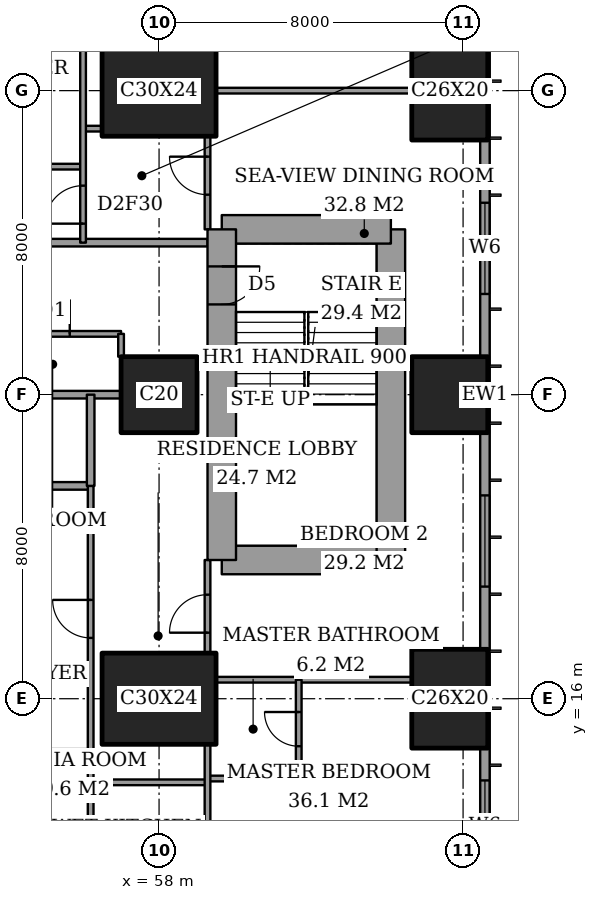
"""IFC4 building model, lengths in metres.
Left out: names, types, materials, properties, quantities, classifications, styles, units other than length and angle.
Written with IfcOpenShell. Run it as: python <this file> out.ifc"""

import sys

from ifc_helpers import new_model, si_unit, direction, frame, frame_2d, origin, origin_2d, place, context, subcontext, project, spatial, rectangle, extrude, element, fill, save


model = new_model("IFC4")
c1 = context("Model", 3, precision=1e-05, world=origin(), true_north=direction((0.0, 1.0)))
c2 = subcontext(c1, "Body", "Model", "MODEL_VIEW")
j1 = project(units=[si_unit("LENGTHUNIT", "METRE"), si_unit("PLANEANGLEUNIT", "RADIAN")], contexts=[c1])
p1 = place(None, origin())
s1 = spatial("IfcSite", under=j1, at=p1, CompositionType="ELEMENT")
p2 = place(p1, origin())
s2 = spatial("IfcBuilding", under=s1, at=p2, CompositionType="ELEMENT")
p3 = place(p2, frame((0.0, 0.0, 44.0)))
s3 = spatial("IfcBuildingStorey", under=s2, at=p3, CompositionType="ELEMENT", Elevation=44.0)
p4 = place(p3, frame((58.0, 16.0, 0.0), z_axis=(0.0, 0.0, 1.0), x_axis=(1.0, 0.0, 0.0)))
e1 = element("IfcColumn", 1, at=p4, inside=s3, PredefinedType="COLUMN", context=c2, shape_type="SweptSolid", body=[
    extrude(rectangle(XDim=3.0, YDim=2.4, at=origin_2d()), origin(), (0.0, 0.0, 1.0), 3.6),
])
p5 = place(p3, frame((58.0, 24.0, 0.0), z_axis=(0.0, 0.0, 1.0), x_axis=(1.0, 0.0, 0.0)))
e2 = element("IfcColumn", 2, at=p5, inside=s3, PredefinedType="COLUMN", context=c2, shape_type="SweptSolid", body=[
    extrude(rectangle(XDim=2.0, YDim=2.0, at=origin_2d()), origin(), (0.0, 0.0, 1.0), 3.6),
])
p6 = place(p3, frame((58.0, 32.0, 0.0), z_axis=(0.0, 0.0, 1.0), x_axis=(1.0, 0.0, 0.0)))
e3 = element("IfcColumn", 3, at=p6, inside=s3, PredefinedType="COLUMN", context=c2, shape_type="SweptSolid", body=[
    extrude(rectangle(XDim=3.0, YDim=2.4, at=origin_2d()), origin(), (0.0, 0.0, 1.0), 3.6),
])
p7 = place(p3, frame((65.65, 16.0, 0.0), z_axis=(0.0, 0.0, 1.0), x_axis=(0.0, 1.0, 0.0)))
e4 = element("IfcColumn", 4, at=p7, inside=s3, PredefinedType="COLUMN", context=c2, shape_type="SweptSolid", body=[
    extrude(rectangle(XDim=2.6, YDim=2.0, at=origin_2d()), origin(), (0.0, 0.0, 1.0), 3.6),
])
p8 = place(p3, frame((65.65, 24.0, 0.0), z_axis=(0.0, 0.0, 1.0), x_axis=(1.0, 0.0, 0.0)))
e5 = element("IfcColumn", 5, at=p8, inside=s3, PredefinedType="COLUMN", context=c2, shape_type="SweptSolid", body=[
    extrude(rectangle(XDim=2.0, YDim=2.0, at=origin_2d()), origin(), (0.0, 0.0, 1.0), 3.6),
])
p9 = place(p3, frame((65.65, 32.0, 0.0), z_axis=(0.0, 0.0, 1.0), x_axis=(0.0, 1.0, 0.0)))
e6 = element("IfcColumn", 6, at=p9, inside=s3, PredefinedType="COLUMN", context=c2, shape_type="SweptSolid", body=[
    extrude(rectangle(XDim=2.6, YDim=2.0, at=origin_2d()), origin(), (0.0, 0.0, 1.0), 3.6),
])
p10 = place(p3, frame((59.65, 19.65, 0.0), z_axis=(0.0, 0.0, 1.0), x_axis=(1.0, 0.0, 0.0)))
e7 = element("IfcWall", 7, at=p10, inside=s3, PredefinedType="SHEAR", context=c2, shape_type="SweptSolid", body=[
    extrude(rectangle(XDim=4.45, YDim=0.75, at=frame_2d((2.225, 0.0))), origin(), (0.0, 0.0, 1.0), 3.6),
])
p11 = place(p3, frame((64.1, 19.65, 0.0), z_axis=(0.0, 0.0, 1.0), x_axis=(0.0, 1.0, 0.0)))
e8 = element("IfcWall", 8, at=p11, inside=s3, PredefinedType="SHEAR", context=c2, shape_type="SweptSolid", body=[
    extrude(rectangle(XDim=8.7, YDim=0.75, at=frame_2d((4.35, 0.0))), origin(), (0.0, 0.0, 1.0), 3.6),
])
p12 = place(p3, frame((64.1, 28.35, 0.0), z_axis=(0.0, 0.0, 1.0), x_axis=(-1.0, 0.0, 0.0)))
e9 = element("IfcWall", 9, at=p12, inside=s3, PredefinedType="SHEAR", context=c2, shape_type="SweptSolid", body=[
    extrude(rectangle(XDim=4.45, YDim=0.75, at=frame_2d((2.225, 0.0))), origin(), (0.0, 0.0, 1.0), 3.6),
])
p13 = place(p3, frame((59.65, 28.35, 0.0), z_axis=(0.0, 0.0, 1.0), x_axis=(0.0, -1.0, 0.0)))
e10 = element("IfcWall", 10, at=p13, inside=s3, PredefinedType="SHEAR", context=c2, shape_type="SweptSolid", body=[
    extrude(rectangle(XDim=8.7, YDim=0.75, at=frame_2d((4.35, 0.0))), origin(), (0.0, 0.0, 1.0), 3.6),
])
p14 = place(p13, frame((0.975, 0.0, 0.0)))
e11 = element("IfcOpeningElement", 11, at=p14, cuts=e10, PredefinedType="OPENING", context=c2, shape_type="SweptSolid", body=[
    extrude(rectangle(XDim=1.0, YDim=2.1, at=frame_2d((0.5, 1.05))), frame((0.0, 0.385, 0.0), z_axis=(0.0, -1.0, 0.0), x_axis=(1.0, 0.0, 0.0)), (0.0, 0.0, 1.0), 0.77),
])
p15 = place(p3, frame((66.575, 3.175, 0.0), z_axis=(0.0, 0.0, 1.0), x_axis=(0.0, 1.0, 0.0)))
e12 = element("IfcWall", 12, at=p15, inside=s3, PredefinedType="SOLIDWALL", context=c2, shape_type="SweptSolid", body=[
    extrude(rectangle(XDim=41.65, YDim=0.25, at=frame_2d((20.825, 0.0))), origin(), (0.0, 0.0, 1.0), 3.6),
])
p16 = place(p15, frame((0.775, 0.0, 0.6)))
e13 = element("IfcOpeningElement", 13, at=p16, cuts=e12, PredefinedType="OPENING", context=c2, shape_type="SweptSolid", body=[
    extrude(rectangle(XDim=2.4, YDim=2.0, at=frame_2d((1.2, 1.0))), frame((0.0, 0.135, 0.0), z_axis=(0.0, -1.0, 0.0), x_axis=(1.0, 0.0, 0.0)), (0.0, 0.0, 1.0), 0.27),
])
p17 = place(p15, frame((6.1, 0.0, 0.6)))
e14 = element("IfcOpeningElement", 14, at=p17, cuts=e12, PredefinedType="OPENING", context=c2, shape_type="SweptSolid", body=[
    extrude(rectangle(XDim=1.2, YDim=2.0, at=frame_2d((0.6, 1.0))), frame((0.0, 0.135, 0.0), z_axis=(0.0, -1.0, 0.0), x_axis=(1.0, 0.0, 0.0)), (0.0, 0.0, 1.0), 0.27),
])
p18 = place(p15, frame((8.275, 0.0, 0.6)))
e15 = element("IfcOpeningElement", 15, at=p18, cuts=e12, PredefinedType="OPENING", context=c2, shape_type="SweptSolid", body=[
    extrude(rectangle(XDim=2.4, YDim=2.0, at=frame_2d((1.2, 1.0))), frame((0.0, 0.135, 0.0), z_axis=(0.0, -1.0, 0.0), x_axis=(1.0, 0.0, 0.0)), (0.0, 0.0, 1.0), 0.27),
])
p19 = place(p15, frame((15.775, 0.0, 0.6)))
e16 = element("IfcOpeningElement", 16, at=p19, cuts=e12, PredefinedType="OPENING", context=c2, shape_type="SweptSolid", body=[
    extrude(rectangle(XDim=2.4, YDim=2.0, at=frame_2d((1.2, 1.0))), frame((0.0, 0.135, 0.0), z_axis=(0.0, -1.0, 0.0), x_axis=(1.0, 0.0, 0.0)), (0.0, 0.0, 1.0), 0.27),
])
p20 = place(p15, frame((23.475, 0.0, 0.6)))
e17 = element("IfcOpeningElement", 17, at=p20, cuts=e12, PredefinedType="OPENING", context=c2, shape_type="SweptSolid", body=[
    extrude(rectangle(XDim=2.4, YDim=2.0, at=frame_2d((1.2, 1.0))), frame((0.0, 0.135, 0.0), z_axis=(0.0, -1.0, 0.0), x_axis=(1.0, 0.0, 0.0)), (0.0, 0.0, 1.0), 0.27),
])
p21 = place(p15, frame((30.975, 0.0, 0.6)))
e18 = element("IfcOpeningElement", 18, at=p21, cuts=e12, PredefinedType="OPENING", context=c2, shape_type="SweptSolid", body=[
    extrude(rectangle(XDim=2.4, YDim=2.0, at=frame_2d((1.2, 1.0))), frame((0.0, 0.135, 0.0), z_axis=(0.0, -1.0, 0.0), x_axis=(1.0, 0.0, 0.0)), (0.0, 0.0, 1.0), 0.27),
])
p22 = place(p15, frame((34.5, 0.0, 0.6)))
e19 = element("IfcOpeningElement", 19, at=p22, cuts=e12, PredefinedType="OPENING", context=c2, shape_type="SweptSolid", body=[
    extrude(rectangle(XDim=1.2, YDim=2.0, at=frame_2d((0.6, 1.0))), frame((0.0, 0.135, 0.0), z_axis=(0.0, -1.0, 0.0), x_axis=(1.0, 0.0, 0.0)), (0.0, 0.0, 1.0), 0.27),
])
p23 = place(p15, frame((38.475, 0.0, 0.6)))
e20 = element("IfcOpeningElement", 20, at=p23, cuts=e12, PredefinedType="OPENING", context=c2, shape_type="SweptSolid", body=[
    extrude(rectangle(XDim=2.4, YDim=2.0, at=frame_2d((1.2, 1.0))), frame((0.0, 0.135, 0.0), z_axis=(0.0, -1.0, 0.0), x_axis=(1.0, 0.0, 0.0)), (0.0, 0.0, 1.0), 0.27),
])
p24 = place(p3, frame((56.2, 13.8, 0.0), z_axis=(0.0, 0.0, 1.0), x_axis=(1.0, 0.0, 0.0)))
e21 = element("IfcWall", 21, at=p24, inside=s3, PredefinedType="PARTITIONING", context=c2, shape_type="SweptSolid", body=[
    extrude(rectangle(XDim=3.075, YDim=0.15, at=frame_2d((1.538, 0.0))), origin(), (0.0, 0.0, 1.0), 3.35),
])
p25 = place(p3, frame((59.275, 13.9, 0.0), z_axis=(0.0, 0.0, 1.0), x_axis=(1.0, 0.0, 0.0)))
e22 = element("IfcWall", 22, at=p25, inside=s3, PredefinedType="PARTITIONING", context=c2, shape_type="SweptSolid", body=[
    extrude(rectangle(XDim=2.4, YDim=0.15, at=frame_2d((1.2, 0.0))), origin(), (0.0, 0.0, 1.0), 3.35),
])
p26 = place(p3, frame((48.0, 14.6, 0.0), z_axis=(0.0, 0.0, 1.0), x_axis=(1.0, 0.0, 0.0)))
e23 = element("IfcWall", 23, at=p26, inside=s3, PredefinedType="PARTITIONING", context=c2, shape_type="SweptSolid", body=[
    extrude(rectangle(XDim=8.2, YDim=0.15, at=frame_2d((4.1, 0.0))), origin(), (0.0, 0.0, 1.0), 3.35),
])
p27 = place(p26, frame((4.2, 0.0, 0.0)))
e24 = element("IfcOpeningElement", 24, at=p27, cuts=e23, PredefinedType="OPENING", context=c2, shape_type="SweptSolid", body=[
    extrude(rectangle(XDim=1.0, YDim=2.1, at=frame_2d((0.5, 1.05))), frame((0.0, 0.085, 0.0), z_axis=(0.0, -1.0, 0.0), x_axis=(1.0, 0.0, 0.0)), (0.0, 0.0, 1.0), 0.17),
])
p28 = place(p3, frame((59.5, 16.5, 0.0), z_axis=(0.0, 0.0, 1.0), x_axis=(1.0, 0.0, 0.0)))
e25 = element("IfcWall", 25, at=p28, inside=s3, PredefinedType="PARTITIONING", context=c2, shape_type="SweptSolid", body=[
    extrude(rectangle(XDim=5.15, YDim=0.15, at=frame_2d((2.575, 0.0))), origin(), (0.0, 0.0, 1.0), 3.35),
])
p29 = place(p3, frame((51.2, 21.6, 0.0), z_axis=(0.0, 0.0, 1.0), x_axis=(1.0, 0.0, 0.0)))
e26 = element("IfcWall", 26, at=p29, inside=s3, PredefinedType="PARTITIONING", context=c2, shape_type="SweptSolid", body=[
    extrude(rectangle(XDim=5.0, YDim=0.2, at=frame_2d((2.5, 0.0))), origin(), (0.0, 0.0, 1.0), 3.35),
])
p30 = place(p29, frame((2.05, 0.0, 0.0)))
e27 = element("IfcOpeningElement", 27, at=p30, cuts=e26, PredefinedType="OPENING", context=c2, shape_type="SweptSolid", body=[
    extrude(rectangle(XDim=0.9, YDim=2.1, at=frame_2d((0.45, 1.05))), frame((0.0, 0.11, 0.0), z_axis=(0.0, -1.0, 0.0), x_axis=(1.0, 0.0, 0.0)), (0.0, 0.0, 1.0), 0.22),
])
p31 = place(p3, frame((51.0, 24.0, 0.0), z_axis=(0.0, 0.0, 1.0), x_axis=(1.0, 0.0, 0.0)))
e28 = element("IfcWall", 28, at=p31, inside=s3, PredefinedType="PARTITIONING", context=c2, shape_type="SweptSolid", body=[
    extrude(rectangle(XDim=6.0, YDim=0.2, at=frame_2d((3.0, 0.0))), origin(), (0.0, 0.0, 1.0), 3.35),
])
p32 = place(p3, frame((53.4, 25.6, 0.0), z_axis=(0.0, 0.0, 1.0), x_axis=(1.0, 0.0, 0.0)))
e29 = element("IfcWall", 29, at=p32, inside=s3, PredefinedType="PARTITIONING", context=c2, shape_type="SweptSolid", body=[
    extrude(rectangle(XDim=3.6, YDim=0.15, at=frame_2d((1.8, 0.0))), origin(), (0.0, 0.0, 1.0), 3.35),
])
p33 = place(p32, frame((1.35, 0.0, 0.0)))
e30 = element("IfcOpeningElement", 30, at=p33, cuts=e29, PredefinedType="OPENING", context=c2, shape_type="SweptSolid", body=[
    extrude(rectangle(XDim=0.9, YDim=2.1, at=frame_2d((0.45, 1.05))), frame((0.0, 0.085, 0.0), z_axis=(0.0, -1.0, 0.0), x_axis=(1.0, 0.0, 0.0)), (0.0, 0.0, 1.0), 0.17),
])
p34 = place(p3, frame((42.0, 28.0, 0.0), z_axis=(0.0, 0.0, 1.0), x_axis=(1.0, 0.0, 0.0)))
e31 = element("IfcWall", 31, at=p34, inside=s3, PredefinedType="PARTITIONING", context=c2, shape_type="SweptSolid", body=[
    extrude(rectangle(XDim=17.275, YDim=0.2, at=frame_2d((8.637, 0.0))), origin(), (0.0, 0.0, 1.0), 3.35),
])
p35 = place(p34, frame((9.4, 0.0, 0.0)))
e32 = element("IfcOpeningElement", 32, at=p35, cuts=e31, PredefinedType="OPENING", context=c2, shape_type="SweptSolid", body=[
    extrude(rectangle(XDim=1.2, YDim=2.4, at=frame_2d((0.6, 1.2))), frame((0.0, 0.11, 0.0), z_axis=(0.0, -1.0, 0.0), x_axis=(1.0, 0.0, 0.0)), (0.0, 0.0, 1.0), 0.22),
])
p36 = place(p3, frame((51.6, 30.0, 0.0), z_axis=(0.0, 0.0, 1.0), x_axis=(1.0, 0.0, 0.0)))
e33 = element("IfcWall", 33, at=p36, inside=s3, PredefinedType="PARTITIONING", context=c2, shape_type="SweptSolid", body=[
    extrude(rectangle(XDim=4.4, YDim=0.15, at=frame_2d((2.2, 0.0))), origin(), (0.0, 0.0, 1.0), 3.35),
])
p37 = place(p36, frame((0.6, 0.0, 0.0)))
e34 = element("IfcOpeningElement", 34, at=p37, cuts=e33, PredefinedType="OPENING", context=c2, shape_type="SweptSolid", body=[
    extrude(rectangle(XDim=1.0, YDim=2.1, at=frame_2d((0.5, 1.05))), frame((0.0, 0.085, 0.0), z_axis=(0.0, -1.0, 0.0), x_axis=(1.0, 0.0, 0.0)), (0.0, 0.0, 1.0), 0.17),
])
p38 = place(p3, frame((56.0, 31.0, 0.0), z_axis=(0.0, 0.0, 1.0), x_axis=(1.0, 0.0, 0.0)))
e35 = element("IfcWall", 35, at=p38, inside=s3, PredefinedType="PARTITIONING", context=c2, shape_type="SweptSolid", body=[
    extrude(rectangle(XDim=0.5, YDim=0.15, at=frame_2d((0.25, 0.0))), origin(), (0.0, 0.0, 1.0), 3.35),
])
p39 = place(p3, frame((59.5, 32.0, 0.0), z_axis=(0.0, 0.0, 1.0), x_axis=(1.0, 0.0, 0.0)))
e36 = element("IfcWall", 36, at=p39, inside=s3, PredefinedType="PARTITIONING", context=c2, shape_type="SweptSolid", body=[
    extrude(rectangle(XDim=5.15, YDim=0.15, at=frame_2d((2.575, 0.0))), origin(), (0.0, 0.0, 1.0), 2.634),
])
p40 = place(p3, frame((56.0, 28.0, 0.0), z_axis=(0.0, 0.0, 1.0), x_axis=(0.0, 1.0, 0.0)))
e37 = element("IfcWall", 37, at=p40, inside=s3, PredefinedType="PARTITIONING", context=c2, shape_type="SweptSolid", body=[
    extrude(rectangle(XDim=9.4, YDim=0.15, at=frame_2d((4.7, 0.0))), origin(), (0.0, 0.0, 1.0), 3.35),
])
p41 = place(p40, frame((0.5, 0.0, 0.0)))
e38 = element("IfcOpeningElement", 38, at=p41, cuts=e37, PredefinedType="OPENING", context=c2, shape_type="SweptSolid", body=[
    extrude(rectangle(XDim=1.0, YDim=2.1, at=frame_2d((0.5, 1.05))), frame((0.0, 0.085, 0.0), z_axis=(0.0, -1.0, 0.0), x_axis=(1.0, 0.0, 0.0)), (0.0, 0.0, 1.0), 0.17),
])
p42 = place(p3, frame((56.2, 21.6, 0.0), z_axis=(0.0, 0.0, 1.0), x_axis=(0.0, 1.0, 0.0)))
e39 = element("IfcWall", 39, at=p42, inside=s3, PredefinedType="PARTITIONING", context=c2, shape_type="SweptSolid", body=[
    extrude(rectangle(XDim=2.4, YDim=0.2, at=frame_2d((1.2, 0.0))), origin(), (0.0, 0.0, 1.0), 3.35),
])
p43 = place(p3, frame((56.2, 10.6, 0.0), z_axis=(0.0, 0.0, 1.0), x_axis=(0.0, 1.0, 0.0)))
e40 = element("IfcWall", 40, at=p43, inside=s3, PredefinedType="PARTITIONING", context=c2, shape_type="SweptSolid", body=[
    extrude(rectangle(XDim=11.0, YDim=0.15, at=frame_2d((5.5, 0.0))), origin(), (0.0, 0.0, 1.0), 3.35),
])
p44 = place(p43, frame((7.0, 0.0, 0.0)))
e41 = element("IfcOpeningElement", 41, at=p44, cuts=e40, PredefinedType="OPENING", context=c2, shape_type="SweptSolid", body=[
    extrude(rectangle(XDim=1.0, YDim=2.1, at=frame_2d((0.5, 1.05))), frame((0.0, 0.085, 0.0), z_axis=(0.0, -1.0, 0.0), x_axis=(1.0, 0.0, 0.0)), (0.0, 0.0, 1.0), 0.17),
])
p45 = place(p3, frame((57.0, 25.0, 0.0), z_axis=(0.0, 0.0, 1.0), x_axis=(0.0, 1.0, 0.0)))
e42 = element("IfcWall", 42, at=p45, inside=s3, PredefinedType="PARTITIONING", context=c2, shape_type="SweptSolid", body=[
    extrude(rectangle(XDim=0.6, YDim=0.15, at=frame_2d((0.3, 0.0))), origin(), (0.0, 0.0, 1.0), 3.35),
])
p46 = place(p3, frame((59.275, 10.6, 0.0), z_axis=(0.0, 0.0, 1.0), x_axis=(0.0, 1.0, 0.0)))
e43 = element("IfcWall", 43, at=p46, inside=s3, PredefinedType="PARTITIONING", context=c2, shape_type="SweptSolid", body=[
    extrude(rectangle(XDim=4.2, YDim=0.15, at=frame_2d((2.1, 0.0))), origin(), (0.0, 0.0, 1.0), 3.35),
])
p47 = place(p3, frame((59.275, 17.2, 0.0), z_axis=(0.0, 0.0, 1.0), x_axis=(0.0, 1.0, 0.0)))
e44 = element("IfcWall", 44, at=p47, inside=s3, PredefinedType="PARTITIONING", context=c2, shape_type="SweptSolid", body=[
    extrude(rectangle(XDim=2.45, YDim=0.15, at=frame_2d((1.225, 0.0))), origin(), (0.0, 0.0, 1.0), 3.35),
])
p48 = place(p47, frame((0.538, 0.0, 0.0)))
e45 = element("IfcOpeningElement", 45, at=p48, cuts=e44, PredefinedType="OPENING", context=c2, shape_type="SweptSolid", body=[
    extrude(rectangle(XDim=1.0, YDim=2.1, at=frame_2d((0.5, 1.05))), frame((0.0, 0.085, 0.0), z_axis=(0.0, -1.0, 0.0), x_axis=(1.0, 0.0, 0.0)), (0.0, 0.0, 1.0), 0.17),
])
p49 = place(p3, frame((59.275, 28.35, 0.0), z_axis=(0.0, 0.0, 1.0), x_axis=(0.0, 1.0, 0.0)))
e46 = element("IfcWall", 46, at=p49, inside=s3, PredefinedType="PARTITIONING", context=c2, shape_type="SweptSolid", body=[
    extrude(rectangle(XDim=2.45, YDim=0.15, at=frame_2d((1.225, 0.0))), origin(), (0.0, 0.0, 1.0), 3.35),
])
p50 = place(p49, frame((0.913, 0.0, 0.0)))
e47 = element("IfcOpeningElement", 47, at=p50, cuts=e46, PredefinedType="OPENING", context=c2, shape_type="SweptSolid", body=[
    extrude(rectangle(XDim=1.0, YDim=2.1, at=frame_2d((0.5, 1.05))), frame((0.0, 0.085, 0.0), z_axis=(0.0, -1.0, 0.0), x_axis=(1.0, 0.0, 0.0)), (0.0, 0.0, 1.0), 0.17),
])
p51 = place(p3, frame((61.675, 13.9, 0.0), z_axis=(0.0, 0.0, 1.0), x_axis=(0.0, 1.0, 0.0)))
e48 = element("IfcWall", 48, at=p51, inside=s3, PredefinedType="PARTITIONING", context=c2, shape_type="SweptSolid", body=[
    extrude(rectangle(XDim=2.6, YDim=0.15, at=frame_2d((1.3, 0.0))), origin(), (0.0, 0.0, 1.0), 3.35),
])
p52 = place(p51, frame((0.85, 0.0, 0.0)))
e49 = element("IfcOpeningElement", 49, at=p52, cuts=e48, PredefinedType="OPENING", context=c2, shape_type="SweptSolid", body=[
    extrude(rectangle(XDim=0.9, YDim=2.1, at=frame_2d((0.45, 1.05))), frame((0.0, 0.085, 0.0), z_axis=(0.0, -1.0, 0.0), x_axis=(1.0, 0.0, 0.0)), (0.0, 0.0, 1.0), 0.17),
])
p53 = place(p18, origin())
e50 = element("IfcWindow", 50, at=p53, inside=s3, PartitioningType="SINGLE_PANEL", PredefinedType="WINDOW", context=c2, shape_type="SweptSolid", body=[
    extrude(rectangle(XDim=2.4, YDim=2.0, at=frame_2d((1.2, 1.0))), frame((0.0, 0.03, 0.0), z_axis=(0.0, -1.0, 0.0), x_axis=(1.0, 0.0, 0.0)), (0.0, 0.0, 1.0), 0.06),
])
fill(e15, e50)
p54 = place(p19, origin())
e51 = element("IfcWindow", 51, at=p54, inside=s3, PartitioningType="SINGLE_PANEL", PredefinedType="WINDOW", context=c2, shape_type="SweptSolid", body=[
    extrude(rectangle(XDim=2.4, YDim=2.0, at=frame_2d((1.2, 1.0))), frame((0.0, 0.03, 0.0), z_axis=(0.0, -1.0, 0.0), x_axis=(1.0, 0.0, 0.0)), (0.0, 0.0, 1.0), 0.06),
])
fill(e16, e51)
p55 = place(p20, origin())
e52 = element("IfcWindow", 52, at=p55, inside=s3, PartitioningType="SINGLE_PANEL", PredefinedType="WINDOW", context=c2, shape_type="SweptSolid", body=[
    extrude(rectangle(XDim=2.4, YDim=2.0, at=frame_2d((1.2, 1.0))), frame((0.0, 0.03, 0.0), z_axis=(0.0, -1.0, 0.0), x_axis=(1.0, 0.0, 0.0)), (0.0, 0.0, 1.0), 0.06),
])
fill(e17, e52)
p56 = place(p52, origin())
e53 = element("IfcDoor", 53, at=p56, inside=s3, OperationType="SINGLE_SWING_LEFT", PredefinedType="DOOR", context=c2, shape_type="SweptSolid", body=[
    extrude(rectangle(XDim=0.9, YDim=2.1, at=frame_2d((0.45, 1.05))), frame((0.0, 0.025, 0.0), z_axis=(0.0, -1.0, 0.0), x_axis=(1.0, 0.0, 0.0)), (0.0, 0.0, 1.0), 0.05),
])
fill(e49, e53)
p57 = place(p48, origin())
e54 = element("IfcDoor", 54, at=p57, inside=s3, OperationType="SINGLE_SWING_RIGHT", PredefinedType="DOOR", context=c2, shape_type="SweptSolid", body=[
    extrude(rectangle(XDim=1.0, YDim=2.1, at=frame_2d((0.5, 1.05))), frame((0.0, 0.025, 0.0), z_axis=(0.0, -1.0, 0.0), x_axis=(1.0, 0.0, 0.0)), (0.0, 0.0, 1.0), 0.05),
])
fill(e45, e54)
p58 = place(p44, origin())
e55 = element("IfcDoor", 55, at=p58, inside=s3, OperationType="SINGLE_SWING_LEFT", PredefinedType="DOOR", context=c2, shape_type="SweptSolid", body=[
    extrude(rectangle(XDim=1.0, YDim=2.1, at=frame_2d((0.5, 1.05))), frame((0.0, 0.025, 0.0), z_axis=(0.0, -1.0, 0.0), x_axis=(1.0, 0.0, 0.0)), (0.0, 0.0, 1.0), 0.05),
])
fill(e41, e55)
p59 = place(p50, origin())
e56 = element("IfcDoor", 56, at=p59, inside=s3, OperationType="SINGLE_SWING_LEFT", PredefinedType="DOOR", context=c2, shape_type="SweptSolid", body=[
    extrude(rectangle(XDim=1.0, YDim=2.1, at=frame_2d((0.5, 1.05))), frame((0.0, 0.025, 0.0), z_axis=(0.0, -1.0, 0.0), x_axis=(1.0, 0.0, 0.0)), (0.0, 0.0, 1.0), 0.05),
])
fill(e47, e56)
p60 = place(p41, origin())
e57 = element("IfcDoor", 57, at=p60, inside=s3, OperationType="SINGLE_SWING_RIGHT", PredefinedType="DOOR", context=c2, shape_type="SweptSolid", body=[
    extrude(rectangle(XDim=1.0, YDim=2.1, at=frame_2d((0.5, 1.05))), frame((0.0, 0.025, 0.0), z_axis=(0.0, -1.0, 0.0), x_axis=(1.0, 0.0, 0.0)), (0.0, 0.0, 1.0), 0.05),
])
fill(e38, e57)
p61 = place(p33, origin())
e58 = element("IfcDoor", 58, at=p61, inside=s3, OperationType="SINGLE_SWING_LEFT", PredefinedType="DOOR", context=c2, shape_type="SweptSolid", body=[
    extrude(rectangle(XDim=0.9, YDim=2.1, at=frame_2d((0.45, 1.05))), frame((0.0, 0.025, 0.0), z_axis=(0.0, -1.0, 0.0), x_axis=(1.0, 0.0, 0.0)), (0.0, 0.0, 1.0), 0.05),
])
fill(e30, e58)
p62 = place(p14, origin())
e59 = element("IfcDoor", 59, at=p62, inside=s3, OperationType="SINGLE_SWING_RIGHT", PredefinedType="DOOR", context=c2, shape_type="SweptSolid", body=[
    extrude(rectangle(XDim=1.0, YDim=2.1, at=frame_2d((0.5, 1.05))), frame((0.0, 0.025, 0.0), z_axis=(0.0, -1.0, 0.0), x_axis=(1.0, 0.0, 0.0)), (0.0, 0.0, 1.0), 0.05),
])
fill(e11, e59)
save(model, sys.argv[1])
